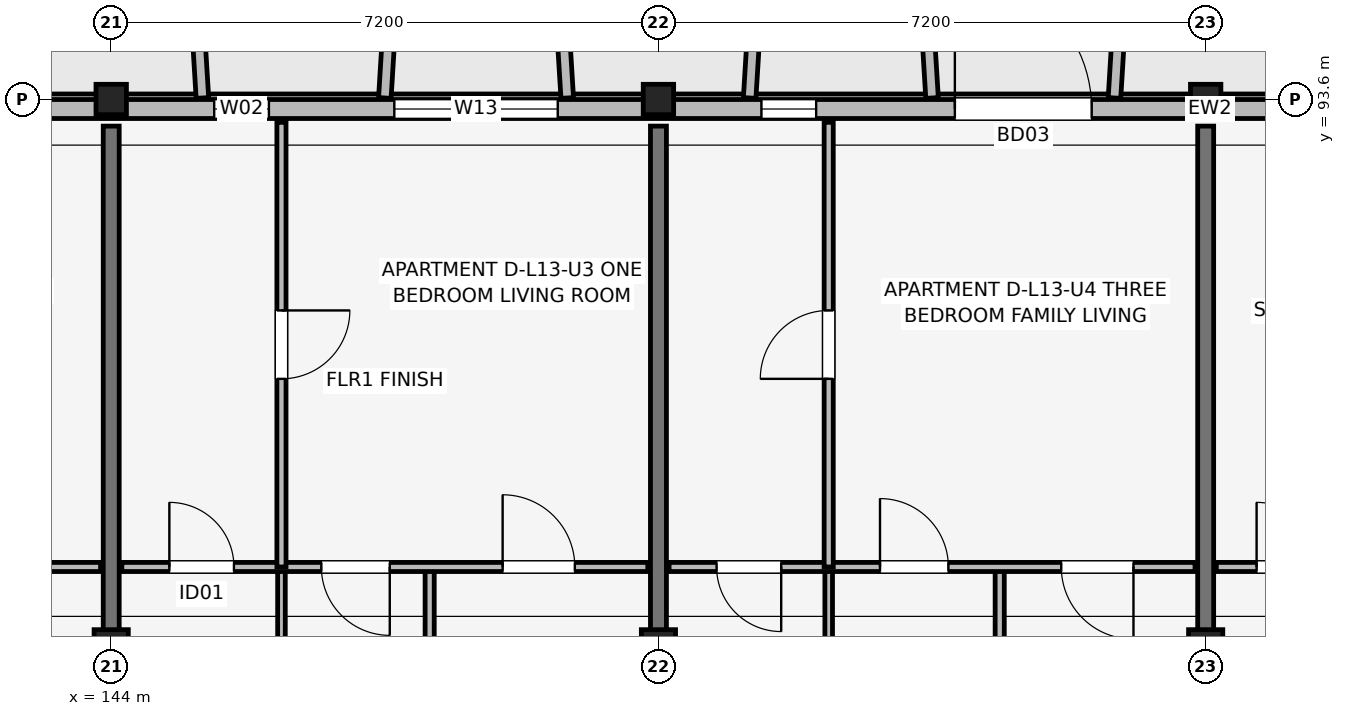
"""IFC4 building model, lengths in metres.
Left out: names, types, materials, properties, quantities, classifications, styles, units other than length and angle.
Written with IfcOpenShell. Run it as: python <this file> out.ifc"""

import sys

from ifc_helpers import new_model, si_unit, direction, frame, frame_2d, origin, origin_2d, place, context, subcontext, project, spatial, rectangle, extrude, element, fill, save


model = new_model("IFC4")
c1 = context("Model", 3, precision=1e-05, world=origin(), true_north=direction((0.0, 1.0)))
c2 = subcontext(c1, "Body", "Model", "MODEL_VIEW")
j1 = project(units=[si_unit("LENGTHUNIT", "METRE"), si_unit("PLANEANGLEUNIT", "RADIAN")], contexts=[c1])
p1 = place(None, origin())
s1 = spatial("IfcSite", under=j1, at=p1, CompositionType="ELEMENT")
p2 = place(p1, origin())
s2 = spatial("IfcBuilding", under=s1, at=p2, CompositionType="ELEMENT")
p3 = place(p2, frame((0.0, 0.0, 43.35)))
s3 = spatial("IfcBuildingStorey", under=s2, at=p3, CompositionType="ELEMENT", Elevation=43.35)
p4 = place(p3, frame((144.0, 86.4, 0.0), z_axis=(0.0, 0.0, 1.0), x_axis=(1.0, 0.0, 0.0)))
e1 = element("IfcColumn", 1, at=p4, inside=s3, PredefinedType="COLUMN", context=c2, shape_type="SweptSolid", body=[
    extrude(rectangle(XDim=0.45, YDim=0.45, at=origin_2d()), origin(), (0.0, 0.0, 1.0), 3.15),
])
p5 = place(p3, frame((144.0, 93.6, 0.0), z_axis=(0.0, 0.0, 1.0), x_axis=(1.0, 0.0, 0.0)))
e2 = element("IfcColumn", 2, at=p5, inside=s3, PredefinedType="COLUMN", context=c2, shape_type="SweptSolid", body=[
    extrude(rectangle(XDim=0.4, YDim=0.4, at=origin_2d()), origin(), (0.0, 0.0, 1.0), 3.15),
])
p6 = place(p3, frame((151.2, 86.4, 0.0), z_axis=(0.0, 0.0, 1.0), x_axis=(1.0, 0.0, 0.0)))
e3 = element("IfcColumn", 3, at=p6, inside=s3, PredefinedType="COLUMN", context=c2, shape_type="SweptSolid", body=[
    extrude(rectangle(XDim=0.45, YDim=0.45, at=origin_2d()), origin(), (0.0, 0.0, 1.0), 3.15),
])
p7 = place(p3, frame((151.2, 93.6, 0.0), z_axis=(0.0, 0.0, 1.0), x_axis=(1.0, 0.0, 0.0)))
e4 = element("IfcColumn", 4, at=p7, inside=s3, PredefinedType="COLUMN", context=c2, shape_type="SweptSolid", body=[
    extrude(rectangle(XDim=0.4, YDim=0.4, at=origin_2d()), origin(), (0.0, 0.0, 1.0), 3.15),
])
p8 = place(p3, frame((158.4, 86.4, 0.0), z_axis=(0.0, 0.0, 1.0), x_axis=(1.0, 0.0, 0.0)))
e5 = element("IfcColumn", 5, at=p8, inside=s3, PredefinedType="COLUMN", context=c2, shape_type="SweptSolid", body=[
    extrude(rectangle(XDim=0.45, YDim=0.45, at=origin_2d()), origin(), (0.0, 0.0, 1.0), 3.15),
])
p9 = place(p3, frame((158.4, 93.6, 0.0), z_axis=(0.0, 0.0, 1.0), x_axis=(1.0, 0.0, 0.0)))
e6 = element("IfcColumn", 6, at=p9, inside=s3, PredefinedType="COLUMN", context=c2, shape_type="SweptSolid", body=[
    extrude(rectangle(XDim=0.4, YDim=0.4, at=origin_2d()), origin(), (0.0, 0.0, 1.0), 3.15),
])
for number, where, z_axis, x_axis in (
    (7, (144.0, 83.85, 0.0), (0.0, 0.0, 1.0), (0.0, 1.0, 0.0)),
    (8, (151.2, 83.85, 0.0), (0.0, 0.0, 1.0), (0.0, 1.0, 0.0)),
    (9, (158.4, 83.85, 0.0), (0.0, 0.0, 1.0), (0.0, 1.0, 0.0)),
):
    element("IfcWall", number, at=place(p3, frame(where, z_axis=z_axis, x_axis=x_axis)), inside=s3, PredefinedType="SHEAR", context=c2, shape_type="SweptSolid", body=[
        extrude(rectangle(XDim=9.4, YDim=0.21, at=frame_2d((4.7, 0.0))), origin(), (0.0, 0.0, 1.0), 3.15),
    ])
p10 = place(p3, frame((162.8, 93.475, 0.0), z_axis=(0.0, 0.0, 1.0), x_axis=(-1.0, 0.0, 0.0)))
e10 = element("IfcWall", 10, at=p10, inside=s3, PredefinedType="SOLIDWALL", context=c2, shape_type="SweptSolid", body=[
    extrude(rectangle(XDim=30.4, YDim=0.25, at=frame_2d((15.2, 0.0))), origin(), (0.0, 0.0, 1.0), 2.45),
])
p11 = place(p10, frame((21.95, 0.0, 0.0), z_axis=(0.0, 0.0, 1.0), x_axis=(-1.0, 0.0, 0.0)))
e11 = element("IfcOpeningElement", 11, at=p11, cuts=e10, PredefinedType="OPENING", context=c2, shape_type="SweptSolid", body=[
    extrude(rectangle(XDim=1.5, YDim=2.15, at=frame_2d((0.75, 1.075))), frame((0.0, 0.135, 0.0), z_axis=(0.0, -1.0, 0.0), x_axis=(1.0, 0.0, 0.0)), (0.0, 0.0, 1.0), 0.27),
])
p12 = place(p10, frame((7.7, 0.0, 0.0), z_axis=(0.0, 0.0, 1.0), x_axis=(-1.0, 0.0, 0.0)))
e12 = element("IfcOpeningElement", 12, at=p12, cuts=e10, PredefinedType="OPENING", context=c2, shape_type="SweptSolid", body=[
    extrude(rectangle(XDim=1.8, YDim=2.15, at=frame_2d((0.9, 1.075))), frame((0.0, 0.135, 0.0), z_axis=(0.0, -1.0, 0.0), x_axis=(1.0, 0.0, 0.0)), (0.0, 0.0, 1.0), 0.27),
])
p13 = place(p10, frame((27.97, 0.0, 0.7)))
e13 = element("IfcOpeningElement", 13, at=p13, cuts=e10, PredefinedType="OPENING", context=c2, shape_type="SweptSolid", body=[
    extrude(rectangle(XDim=1.46, YDim=1.55, at=frame_2d((0.73, 0.775))), frame((0.0, 0.135, 0.0), z_axis=(0.0, -1.0, 0.0), x_axis=(1.0, 0.0, 0.0)), (0.0, 0.0, 1.0), 0.27),
])
p14 = place(p10, frame((26.42, 0.0, 0.75)))
e14 = element("IfcOpeningElement", 14, at=p14, cuts=e10, PredefinedType="OPENING", context=c2, shape_type="SweptSolid", body=[
    extrude(rectangle(XDim=0.6, YDim=1.25, at=frame_2d((0.3, 0.625))), frame((0.0, 0.135, 0.0), z_axis=(0.0, -1.0, 0.0), x_axis=(1.0, 0.0, 0.0)), (0.0, 0.0, 1.0), 0.27),
])
p15 = place(p10, frame((24.98, 0.0, 0.75)))
e15 = element("IfcOpeningElement", 15, at=p15, cuts=e10, PredefinedType="OPENING", context=c2, shape_type="SweptSolid", body=[
    extrude(rectangle(XDim=0.6, YDim=1.25, at=frame_2d((0.3, 0.625))), frame((0.0, 0.135, 0.0), z_axis=(0.0, -1.0, 0.0), x_axis=(1.0, 0.0, 0.0)), (0.0, 0.0, 1.0), 0.27),
])
p16 = place(p10, frame((16.725, 0.0, 0.75)))
e16 = element("IfcOpeningElement", 16, at=p16, cuts=e10, PredefinedType="OPENING", context=c2, shape_type="SweptSolid", body=[
    extrude(rectangle(XDim=0.72, YDim=1.35, at=frame_2d((0.36, 0.675))), frame((0.0, 0.135, 0.0), z_axis=(0.0, -1.0, 0.0), x_axis=(1.0, 0.0, 0.0)), (0.0, 0.0, 1.0), 0.27),
])
p17 = place(p10, frame((12.925, 0.0, 0.69)))
e17 = element("IfcOpeningElement", 17, at=p17, cuts=e10, PredefinedType="OPENING", context=c2, shape_type="SweptSolid", body=[
    extrude(rectangle(XDim=2.15, YDim=1.65, at=frame_2d((1.075, 0.825))), frame((0.0, 0.135, 0.0), z_axis=(0.0, -1.0, 0.0), x_axis=(1.0, 0.0, 0.0)), (0.0, 0.0, 1.0), 0.27),
])
p18 = place(p10, frame((9.525, 0.0, 0.75)))
e18 = element("IfcOpeningElement", 18, at=p18, cuts=e10, PredefinedType="OPENING", context=c2, shape_type="SweptSolid", body=[
    extrude(rectangle(XDim=0.72, YDim=1.35, at=frame_2d((0.36, 0.675))), frame((0.0, 0.135, 0.0), z_axis=(0.0, -1.0, 0.0), x_axis=(1.0, 0.0, 0.0)), (0.0, 0.0, 1.0), 0.27),
])
p19 = place(p10, frame((1.21, 0.0, 0.7)))
e19 = element("IfcOpeningElement", 19, at=p19, cuts=e10, PredefinedType="OPENING", context=c2, shape_type="SweptSolid", body=[
    extrude(rectangle(XDim=1.58, YDim=1.6, at=frame_2d((0.79, 0.8))), frame((0.0, 0.135, 0.0), z_axis=(0.0, -1.0, 0.0), x_axis=(1.0, 0.0, 0.0)), (0.0, 0.0, 1.0), 0.27),
])
for number, where, z_axis, x_axis in (
    (20, (145.2, 93.62, 0.0), (0.0, 0.0, 1.0), (-0.061, 0.998, 0.0)),
    (21, (147.6, 93.62, 0.0), (0.0, 0.0, 1.0), (0.061, 0.998, 0.0)),
    (22, (150.0, 93.62, 0.0), (0.0, 0.0, 1.0), (-0.061, 0.998, 0.0)),
):
    element("IfcWall", number, at=place(p3, frame(where, z_axis=z_axis, x_axis=x_axis)), inside=s3, PredefinedType="ELEMENTEDWALL", context=c2, shape_type="SweptSolid", body=[
        extrude(rectangle(XDim=1.964, YDim=0.165, at=frame_2d((0.982, 0.0))), origin(), (0.0, 0.0, 1.0), 2.48),
    ])
for number, where, z_axis, x_axis in (
    (23, (152.4, 93.62, 0.0), (0.0, 0.0, 1.0), (0.061, 0.998, 0.0)),
    (24, (154.8, 93.62, 0.0), (0.0, 0.0, 1.0), (-0.061, 0.998, 0.0)),
    (25, (157.2, 93.62, 0.0), (0.0, 0.0, 1.0), (0.061, 0.998, 0.0)),
):
    element("IfcWall", number, at=place(p3, frame(where, z_axis=z_axis, x_axis=x_axis)), inside=s3, PredefinedType="ELEMENTEDWALL", context=c2, shape_type="SweptSolid", body=[
        extrude(rectangle(XDim=1.964, YDim=0.165, at=frame_2d((0.982, 0.0))), origin(), (0.0, 0.0, 1.0), 2.53),
    ])
p20 = place(p3, frame((136.94, 87.45, 0.0), z_axis=(0.0, 0.0, 1.0), x_axis=(1.0, 0.0, 0.0)))
e26 = element("IfcWall", 26, at=p20, inside=s3, PredefinedType="PARTITIONING", context=c2, shape_type="SweptSolid", body=[
    extrude(rectangle(XDim=6.92, YDim=0.12, at=frame_2d((3.46, 0.0))), origin(), (0.0, 0.0, 1.0), 2.38),
])
p21 = place(p20, frame((1.35, 0.0, 0.0), z_axis=(0.0, 0.0, 1.0), x_axis=(-1.0, 0.0, 0.0)))
e27 = element("IfcOpeningElement", 27, at=p21, cuts=e26, PredefinedType="OPENING", context=c2, shape_type="SweptSolid", body=[
    extrude(rectangle(XDim=0.85, YDim=2.08, at=frame_2d((0.425, 1.04))), frame((0.0, 0.07, 0.0), z_axis=(0.0, -1.0, 0.0), x_axis=(1.0, 0.0, 0.0)), (0.0, 0.0, 1.0), 0.14),
])
p22 = place(p20, frame((2.525, 0.0, 0.0)))
e28 = element("IfcOpeningElement", 28, at=p22, cuts=e26, PredefinedType="OPENING", context=c2, shape_type="SweptSolid", body=[
    extrude(rectangle(XDim=0.9, YDim=2.08, at=frame_2d((0.45, 1.04))), frame((0.0, 0.07, 0.0), z_axis=(0.0, -1.0, 0.0), x_axis=(1.0, 0.0, 0.0)), (0.0, 0.0, 1.0), 0.14),
])
p23 = place(p20, frame((5.985, 0.0, 0.0), z_axis=(0.0, 0.0, 1.0), x_axis=(-1.0, 0.0, 0.0)))
e29 = element("IfcOpeningElement", 29, at=p23, cuts=e26, PredefinedType="OPENING", context=c2, shape_type="SweptSolid", body=[
    extrude(rectangle(XDim=0.95, YDim=2.08, at=frame_2d((0.475, 1.04))), frame((0.0, 0.07, 0.0), z_axis=(0.0, -1.0, 0.0), x_axis=(1.0, 0.0, 0.0)), (0.0, 0.0, 1.0), 0.14),
])
p24 = place(p3, frame((146.24, 83.7, 0.0), z_axis=(0.0, 0.0, 1.0), x_axis=(0.0, 1.0, 0.0)))
e30 = element("IfcWall", 30, at=p24, inside=s3, PredefinedType="PARTITIONING", context=c2, shape_type="SweptSolid", body=[
    extrude(rectangle(XDim=3.75, YDim=0.1, at=frame_2d((1.875, 0.0))), origin(), (0.0, 0.0, 1.0), 2.38),
])
p25 = place(p3, frame((148.19, 83.7, 0.0), z_axis=(0.0, 0.0, 1.0), x_axis=(0.0, 1.0, 0.0)))
e31 = element("IfcWall", 31, at=p25, inside=s3, PredefinedType="PARTITIONING", context=c2, shape_type="SweptSolid", body=[
    extrude(rectangle(XDim=3.75, YDim=0.12, at=frame_2d((1.875, 0.0))), origin(), (0.0, 0.0, 1.0), 2.38),
])
p26 = place(p3, frame((144.14, 87.45, 0.0), z_axis=(0.0, 0.0, 1.0), x_axis=(1.0, 0.0, 0.0)))
e32 = element("IfcWall", 32, at=p26, inside=s3, PredefinedType="PARTITIONING", context=c2, shape_type="SweptSolid", body=[
    extrude(rectangle(XDim=6.92, YDim=0.12, at=frame_2d((3.46, 0.0))), origin(), (0.0, 0.0, 1.0), 2.38),
])
p27 = place(p26, frame((0.625, 0.0, 0.0)))
e33 = element("IfcOpeningElement", 33, at=p27, cuts=e32, PredefinedType="OPENING", context=c2, shape_type="SweptSolid", body=[
    extrude(rectangle(XDim=0.85, YDim=2.08, at=frame_2d((0.425, 1.04))), frame((0.0, 0.07, 0.0), z_axis=(0.0, -1.0, 0.0), x_axis=(1.0, 0.0, 0.0)), (0.0, 0.0, 1.0), 0.14),
])
p28 = place(p26, frame((3.525, 0.0, 0.0), z_axis=(0.0, 0.0, 1.0), x_axis=(-1.0, 0.0, 0.0)))
e34 = element("IfcOpeningElement", 34, at=p28, cuts=e32, PredefinedType="OPENING", context=c2, shape_type="SweptSolid", body=[
    extrude(rectangle(XDim=0.9, YDim=2.08, at=frame_2d((0.45, 1.04))), frame((0.0, 0.07, 0.0), z_axis=(0.0, -1.0, 0.0), x_axis=(1.0, 0.0, 0.0)), (0.0, 0.0, 1.0), 0.14),
])
p29 = place(p26, frame((5.01, 0.0, 0.0)))
e35 = element("IfcOpeningElement", 35, at=p29, cuts=e32, PredefinedType="OPENING", context=c2, shape_type="SweptSolid", body=[
    extrude(rectangle(XDim=0.95, YDim=2.08, at=frame_2d((0.475, 1.04))), frame((0.0, 0.07, 0.0), z_axis=(0.0, -1.0, 0.0), x_axis=(1.0, 0.0, 0.0)), (0.0, 0.0, 1.0), 0.14),
])
p30 = place(p3, frame((146.24, 87.45, 0.0), z_axis=(0.0, 0.0, 1.0), x_axis=(0.0, 1.0, 0.0)))
e36 = element("IfcWall", 36, at=p30, inside=s3, PredefinedType="PARTITIONING", context=c2, shape_type="SweptSolid", body=[
    extrude(rectangle(XDim=5.85, YDim=0.12, at=frame_2d((2.925, 0.0))), origin(), (0.0, 0.0, 1.0), 2.38),
])
p31 = place(p30, frame((3.375, 0.0, 0.0), z_axis=(0.0, 0.0, 1.0), x_axis=(-1.0, 0.0, 0.0)))
e37 = element("IfcOpeningElement", 37, at=p31, cuts=e36, PredefinedType="OPENING", context=c2, shape_type="SweptSolid", body=[
    extrude(rectangle(XDim=0.9, YDim=2.08, at=frame_2d((0.45, 1.04))), frame((0.0, 0.07, 0.0), z_axis=(0.0, -1.0, 0.0), x_axis=(1.0, 0.0, 0.0)), (0.0, 0.0, 1.0), 0.14),
])
p32 = place(p3, frame((153.44, 83.7, 0.0), z_axis=(0.0, 0.0, 1.0), x_axis=(0.0, 1.0, 0.0)))
e38 = element("IfcWall", 38, at=p32, inside=s3, PredefinedType="PARTITIONING", context=c2, shape_type="SweptSolid", body=[
    extrude(rectangle(XDim=3.75, YDim=0.1, at=frame_2d((1.875, 0.0))), origin(), (0.0, 0.0, 1.0), 2.38),
])
p33 = place(p3, frame((155.69, 83.7, 0.0), z_axis=(0.0, 0.0, 1.0), x_axis=(0.0, 1.0, 0.0)))
e39 = element("IfcWall", 39, at=p33, inside=s3, PredefinedType="PARTITIONING", context=c2, shape_type="SweptSolid", body=[
    extrude(rectangle(XDim=3.75, YDim=0.12, at=frame_2d((1.875, 0.0))), origin(), (0.0, 0.0, 1.0), 2.38),
])
p34 = place(p3, frame((151.34, 87.45, 0.0), z_axis=(0.0, 0.0, 1.0), x_axis=(1.0, 0.0, 0.0)))
e40 = element("IfcWall", 40, at=p34, inside=s3, PredefinedType="PARTITIONING", context=c2, shape_type="SweptSolid", body=[
    extrude(rectangle(XDim=6.92, YDim=0.12, at=frame_2d((3.46, 0.0))), origin(), (0.0, 0.0, 1.0), 2.38),
])
p35 = place(p34, frame((1.475, 0.0, 0.0), z_axis=(0.0, 0.0, 1.0), x_axis=(-1.0, 0.0, 0.0)))
e41 = element("IfcOpeningElement", 41, at=p35, cuts=e40, PredefinedType="OPENING", context=c2, shape_type="SweptSolid", body=[
    extrude(rectangle(XDim=0.85, YDim=2.08, at=frame_2d((0.425, 1.04))), frame((0.0, 0.07, 0.0), z_axis=(0.0, -1.0, 0.0), x_axis=(1.0, 0.0, 0.0)), (0.0, 0.0, 1.0), 0.14),
])
p36 = place(p34, frame((2.775, 0.0, 0.0)))
e42 = element("IfcOpeningElement", 42, at=p36, cuts=e40, PredefinedType="OPENING", context=c2, shape_type="SweptSolid", body=[
    extrude(rectangle(XDim=0.9, YDim=2.08, at=frame_2d((0.45, 1.04))), frame((0.0, 0.07, 0.0), z_axis=(0.0, -1.0, 0.0), x_axis=(1.0, 0.0, 0.0)), (0.0, 0.0, 1.0), 0.14),
])
p37 = place(p34, frame((6.11, 0.0, 0.0), z_axis=(0.0, 0.0, 1.0), x_axis=(-1.0, 0.0, 0.0)))
e43 = element("IfcOpeningElement", 43, at=p37, cuts=e40, PredefinedType="OPENING", context=c2, shape_type="SweptSolid", body=[
    extrude(rectangle(XDim=0.95, YDim=2.08, at=frame_2d((0.475, 1.04))), frame((0.0, 0.07, 0.0), z_axis=(0.0, -1.0, 0.0), x_axis=(1.0, 0.0, 0.0)), (0.0, 0.0, 1.0), 0.14),
])
p38 = place(p3, frame((153.44, 87.45, 0.0), z_axis=(0.0, 0.0, 1.0), x_axis=(0.0, 1.0, 0.0)))
e44 = element("IfcWall", 44, at=p38, inside=s3, PredefinedType="PARTITIONING", context=c2, shape_type="SweptSolid", body=[
    extrude(rectangle(XDim=5.85, YDim=0.12, at=frame_2d((2.925, 0.0))), origin(), (0.0, 0.0, 1.0), 2.38),
])
p39 = place(p38, frame((2.475, 0.0, 0.0)))
e45 = element("IfcOpeningElement", 45, at=p39, cuts=e44, PredefinedType="OPENING", context=c2, shape_type="SweptSolid", body=[
    extrude(rectangle(XDim=0.9, YDim=2.08, at=frame_2d((0.45, 1.04))), frame((0.0, 0.07, 0.0), z_axis=(0.0, -1.0, 0.0), x_axis=(1.0, 0.0, 0.0)), (0.0, 0.0, 1.0), 0.14),
])
p40 = place(p3, frame((158.54, 87.45, 0.0), z_axis=(0.0, 0.0, 1.0), x_axis=(1.0, 0.0, 0.0)))
e46 = element("IfcWall", 46, at=p40, inside=s3, PredefinedType="PARTITIONING", context=c2, shape_type="SweptSolid", body=[
    extrude(rectangle(XDim=6.92, YDim=0.12, at=frame_2d((3.46, 0.0))), origin(), (0.0, 0.0, 1.0), 2.38),
])
p41 = place(p40, frame((0.53, 0.0, 0.0)))
e47 = element("IfcOpeningElement", 47, at=p41, cuts=e46, PredefinedType="OPENING", context=c2, shape_type="SweptSolid", body=[
    extrude(rectangle(XDim=0.85, YDim=2.08, at=frame_2d((0.425, 1.04))), frame((0.0, 0.07, 0.0), z_axis=(0.0, -1.0, 0.0), x_axis=(1.0, 0.0, 0.0)), (0.0, 0.0, 1.0), 0.14),
])
p42 = place(p40, frame((3.185, 0.0, 0.0), z_axis=(0.0, 0.0, 1.0), x_axis=(-1.0, 0.0, 0.0)))
e48 = element("IfcOpeningElement", 48, at=p42, cuts=e46, PredefinedType="OPENING", context=c2, shape_type="SweptSolid", body=[
    extrude(rectangle(XDim=0.9, YDim=2.08, at=frame_2d((0.45, 1.04))), frame((0.0, 0.07, 0.0), z_axis=(0.0, -1.0, 0.0), x_axis=(1.0, 0.0, 0.0)), (0.0, 0.0, 1.0), 0.14),
])
p43 = place(p40, frame((3.91, 0.0, 0.0)))
e49 = element("IfcOpeningElement", 49, at=p43, cuts=e46, PredefinedType="OPENING", context=c2, shape_type="SweptSolid", body=[
    extrude(rectangle(XDim=0.95, YDim=2.08, at=frame_2d((0.475, 1.04))), frame((0.0, 0.07, 0.0), z_axis=(0.0, -1.0, 0.0), x_axis=(1.0, 0.0, 0.0)), (0.0, 0.0, 1.0), 0.14),
])
p44 = place(p12, origin())
e50 = element("IfcDoor", 50, at=p44, inside=s3, OperationType="SINGLE_SWING_RIGHT", PredefinedType="DOOR", context=c2, shape_type="SweptSolid", body=[
    extrude(rectangle(XDim=1.8, YDim=2.15, at=frame_2d((0.9, 1.075))), frame((0.0, 0.025, 0.0), z_axis=(0.0, -1.0, 0.0), x_axis=(1.0, 0.0, 0.0)), (0.0, 0.0, 1.0), 0.05),
])
fill(e12, e50)
p45 = place(p16, origin())
e51 = element("IfcWindow", 51, at=p45, inside=s3, PartitioningType="SINGLE_PANEL", PredefinedType="WINDOW", context=c2, shape_type="SweptSolid", body=[
    extrude(rectangle(XDim=0.72, YDim=1.35, at=frame_2d((0.36, 0.675))), frame((0.0, 0.03, 0.0), z_axis=(0.0, -1.0, 0.0), x_axis=(1.0, 0.0, 0.0)), (0.0, 0.0, 1.0), 0.06),
])
fill(e16, e51)
p46 = place(p17, origin())
e52 = element("IfcWindow", 52, at=p46, inside=s3, PartitioningType="SINGLE_PANEL", PredefinedType="WINDOW", context=c2, shape_type="SweptSolid", body=[
    extrude(rectangle(XDim=2.15, YDim=1.65, at=frame_2d((1.075, 0.825))), frame((0.0, 0.03, 0.0), z_axis=(0.0, -1.0, 0.0), x_axis=(1.0, 0.0, 0.0)), (0.0, 0.0, 1.0), 0.06),
])
fill(e17, e52)
p47 = place(p18, origin())
e53 = element("IfcWindow", 53, at=p47, inside=s3, PartitioningType="SINGLE_PANEL", PredefinedType="WINDOW", context=c2, shape_type="SweptSolid", body=[
    extrude(rectangle(XDim=0.72, YDim=1.35, at=frame_2d((0.36, 0.675))), frame((0.0, 0.03, 0.0), z_axis=(0.0, -1.0, 0.0), x_axis=(1.0, 0.0, 0.0)), (0.0, 0.0, 1.0), 0.06),
])
fill(e18, e53)
p48 = place(p27, origin())
e54 = element("IfcDoor", 54, at=p48, inside=s3, OperationType="SINGLE_SWING_LEFT", PredefinedType="DOOR", context=c2, shape_type="SweptSolid", body=[
    extrude(rectangle(XDim=0.85, YDim=2.08, at=frame_2d((0.425, 1.04))), frame((0.0, 0.025, 0.0), z_axis=(0.0, -1.0, 0.0), x_axis=(1.0, 0.0, 0.0)), (0.0, 0.0, 1.0), 0.05),
])
fill(e33, e54)
p49 = place(p28, origin())
e55 = element("IfcDoor", 55, at=p49, inside=s3, OperationType="SINGLE_SWING_RIGHT", PredefinedType="DOOR", context=c2, shape_type="SweptSolid", body=[
    extrude(rectangle(XDim=0.9, YDim=2.08, at=frame_2d((0.45, 1.04))), frame((0.0, 0.025, 0.0), z_axis=(0.0, -1.0, 0.0), x_axis=(1.0, 0.0, 0.0)), (0.0, 0.0, 1.0), 0.05),
])
fill(e34, e55)
p50 = place(p29, origin())
e56 = element("IfcDoor", 56, at=p50, inside=s3, OperationType="SINGLE_SWING_LEFT", PredefinedType="DOOR", context=c2, shape_type="SweptSolid", body=[
    extrude(rectangle(XDim=0.95, YDim=2.08, at=frame_2d((0.475, 1.04))), frame((0.0, 0.025, 0.0), z_axis=(0.0, -1.0, 0.0), x_axis=(1.0, 0.0, 0.0)), (0.0, 0.0, 1.0), 0.05),
])
fill(e35, e56)
p51 = place(p31, origin())
e57 = element("IfcDoor", 57, at=p51, inside=s3, OperationType="SINGLE_SWING_RIGHT", PredefinedType="DOOR", context=c2, shape_type="SweptSolid", body=[
    extrude(rectangle(XDim=0.9, YDim=2.08, at=frame_2d((0.45, 1.04))), frame((0.0, 0.025, 0.0), z_axis=(0.0, -1.0, 0.0), x_axis=(1.0, 0.0, 0.0)), (0.0, 0.0, 1.0), 0.05),
])
fill(e37, e57)
p52 = place(p35, origin())
e58 = element("IfcDoor", 58, at=p52, inside=s3, OperationType="SINGLE_SWING_RIGHT", PredefinedType="DOOR", context=c2, shape_type="SweptSolid", body=[
    extrude(rectangle(XDim=0.85, YDim=2.08, at=frame_2d((0.425, 1.04))), frame((0.0, 0.025, 0.0), z_axis=(0.0, -1.0, 0.0), x_axis=(1.0, 0.0, 0.0)), (0.0, 0.0, 1.0), 0.05),
])
fill(e41, e58)
p53 = place(p36, origin())
e59 = element("IfcDoor", 59, at=p53, inside=s3, OperationType="SINGLE_SWING_LEFT", PredefinedType="DOOR", context=c2, shape_type="SweptSolid", body=[
    extrude(rectangle(XDim=0.9, YDim=2.08, at=frame_2d((0.45, 1.04))), frame((0.0, 0.025, 0.0), z_axis=(0.0, -1.0, 0.0), x_axis=(1.0, 0.0, 0.0)), (0.0, 0.0, 1.0), 0.05),
])
fill(e42, e59)
p54 = place(p37, origin())
e60 = element("IfcDoor", 60, at=p54, inside=s3, OperationType="SINGLE_SWING_RIGHT", PredefinedType="DOOR", context=c2, shape_type="SweptSolid", body=[
    extrude(rectangle(XDim=0.95, YDim=2.08, at=frame_2d((0.475, 1.04))), frame((0.0, 0.025, 0.0), z_axis=(0.0, -1.0, 0.0), x_axis=(1.0, 0.0, 0.0)), (0.0, 0.0, 1.0), 0.05),
])
fill(e43, e60)
p55 = place(p39, origin())
e61 = element("IfcDoor", 61, at=p55, inside=s3, OperationType="SINGLE_SWING_LEFT", PredefinedType="DOOR", context=c2, shape_type="SweptSolid", body=[
    extrude(rectangle(XDim=0.9, YDim=2.08, at=frame_2d((0.45, 1.04))), frame((0.0, 0.025, 0.0), z_axis=(0.0, -1.0, 0.0), x_axis=(1.0, 0.0, 0.0)), (0.0, 0.0, 1.0), 0.05),
])
fill(e45, e61)
p56 = place(p41, origin())
e62 = element("IfcDoor", 62, at=p56, inside=s3, OperationType="SINGLE_SWING_LEFT", PredefinedType="DOOR", context=c2, shape_type="SweptSolid", body=[
    extrude(rectangle(XDim=0.85, YDim=2.08, at=frame_2d((0.425, 1.04))), frame((0.0, 0.025, 0.0), z_axis=(0.0, -1.0, 0.0), x_axis=(1.0, 0.0, 0.0)), (0.0, 0.0, 1.0), 0.05),
])
fill(e47, e62)
save(model, sys.argv[1])
